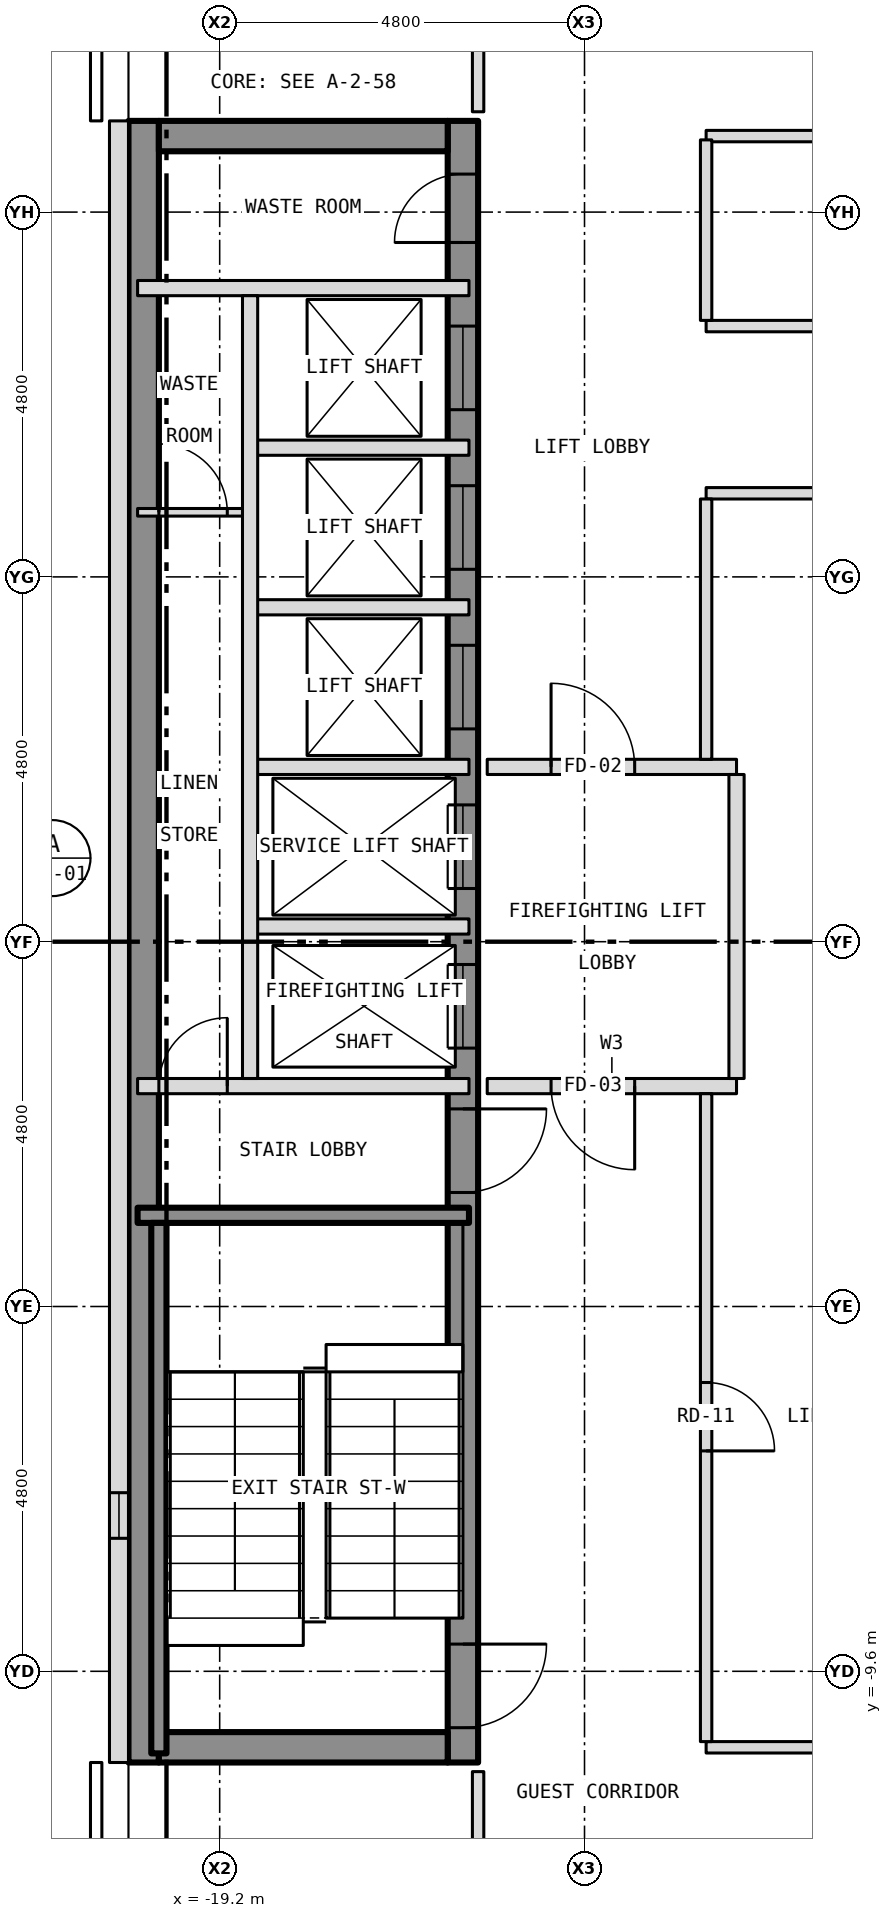
"""IFC4 building model, lengths in metres.
Left out: names, types, materials, properties, quantities, classifications, styles, units other than length and angle.
Written with IfcOpenShell. Run it as: python <this file> out.ifc"""

import sys

from ifc_helpers import new_model, si_unit, direction, frame, frame_2d, origin, place, context, subcontext, project, spatial, rectangle, extrude, element, fill, save


model = new_model("IFC4")
c1 = context("Model", 3, precision=1e-05, world=origin(), true_north=direction((0.0, 1.0)))
c2 = subcontext(c1, "Body", "Model", "MODEL_VIEW")
j1 = project(units=[si_unit("LENGTHUNIT", "METRE"), si_unit("PLANEANGLEUNIT", "RADIAN")], contexts=[c1])
p1 = place(None, origin())
s1 = spatial("IfcSite", under=j1, at=p1, CompositionType="ELEMENT")
p2 = place(p1, origin())
s2 = spatial("IfcBuilding", under=s1, at=p2, CompositionType="ELEMENT")
p3 = place(p2, frame((0.0, 0.0, 212.0)))
s3 = spatial("IfcBuildingStorey", under=s2, at=p3, CompositionType="ELEMENT", Elevation=212.0)
p4 = place(p3, frame((-16.0, -10.8, 0.0), z_axis=(0.0, 0.0, 1.0), x_axis=(0.0, 1.0, 0.0)))
e1 = element("IfcWall", 1, at=p4, inside=s3, PredefinedType="SHEAR", context=c2, shape_type="SweptSolid", body=[
    extrude(rectangle(XDim=21.6, YDim=0.4, at=frame_2d((10.8, 0.0))), origin(), (0.0, 0.0, 1.0), 3.25),
])
p5 = place(p4, frame((9.4, 0.0, 0.0)))
e2 = element("IfcOpeningElement", 2, at=p5, cuts=e1, PredefinedType="OPENING", context=c2, shape_type="SweptSolid", body=[
    extrude(rectangle(XDim=1.1, YDim=2.1, at=frame_2d((0.55, 1.05))), frame((0.0, 0.212, 0.0), z_axis=(0.0, -1.0, 0.0), x_axis=(1.0, 0.0, 0.0)), (0.0, 0.0, 1.0), 0.424),
])
p6 = place(p4, frame((11.5, 0.0, 0.0)))
e3 = element("IfcOpeningElement", 3, at=p6, cuts=e1, PredefinedType="OPENING", context=c2, shape_type="SweptSolid", body=[
    extrude(rectangle(XDim=1.1, YDim=2.1, at=frame_2d((0.55, 1.05))), frame((0.0, 0.212, 0.0), z_axis=(0.0, -1.0, 0.0), x_axis=(1.0, 0.0, 0.0)), (0.0, 0.0, 1.0), 0.424),
])
p7 = place(p4, frame((13.6, 0.0, 0.0)))
e4 = element("IfcOpeningElement", 4, at=p7, cuts=e1, PredefinedType="OPENING", context=c2, shape_type="SweptSolid", body=[
    extrude(rectangle(XDim=1.1, YDim=2.1, at=frame_2d((0.55, 1.05))), frame((0.0, 0.212, 0.0), z_axis=(0.0, -1.0, 0.0), x_axis=(1.0, 0.0, 0.0)), (0.0, 0.0, 1.0), 0.424),
])
p8 = place(p4, frame((15.7, 0.0, 0.0)))
e5 = element("IfcOpeningElement", 5, at=p8, cuts=e1, PredefinedType="OPENING", context=c2, shape_type="SweptSolid", body=[
    extrude(rectangle(XDim=1.1, YDim=2.1, at=frame_2d((0.55, 1.05))), frame((0.0, 0.212, 0.0), z_axis=(0.0, -1.0, 0.0), x_axis=(1.0, 0.0, 0.0)), (0.0, 0.0, 1.0), 0.424),
])
p9 = place(p4, frame((17.8, 0.0, 0.0)))
e6 = element("IfcOpeningElement", 6, at=p9, cuts=e1, PredefinedType="OPENING", context=c2, shape_type="SweptSolid", body=[
    extrude(rectangle(XDim=1.1, YDim=2.1, at=frame_2d((0.55, 1.05))), frame((0.0, 0.212, 0.0), z_axis=(0.0, -1.0, 0.0), x_axis=(1.0, 0.0, 0.0)), (0.0, 0.0, 1.0), 0.424),
])
p10 = place(p4, frame((0.458, 0.0, 0.0)))
e7 = element("IfcOpeningElement", 7, at=p10, cuts=e1, PredefinedType="OPENING", context=c2, shape_type="SweptSolid", body=[
    extrude(rectangle(XDim=1.1, YDim=2.1, at=frame_2d((0.55, 1.05))), frame((0.0, 0.212, 0.0), z_axis=(0.0, -1.0, 0.0), x_axis=(1.0, 0.0, 0.0)), (0.0, 0.0, 1.0), 0.424),
])
p11 = place(p4, frame((7.5, 0.0, 0.0)))
e8 = element("IfcOpeningElement", 8, at=p11, cuts=e1, PredefinedType="OPENING", context=c2, shape_type="SweptSolid", body=[
    extrude(rectangle(XDim=1.1, YDim=2.1, at=frame_2d((0.55, 1.05))), frame((0.0, 0.212, 0.0), z_axis=(0.0, -1.0, 0.0), x_axis=(1.0, 0.0, 0.0)), (0.0, 0.0, 1.0), 0.424),
])
p12 = place(p4, frame((20.0, 0.0, 0.0)))
e9 = element("IfcOpeningElement", 9, at=p12, cuts=e1, PredefinedType="OPENING", context=c2, shape_type="SweptSolid", body=[
    extrude(rectangle(XDim=0.9, YDim=2.1, at=frame_2d((0.45, 1.05))), frame((0.0, 0.212, 0.0), z_axis=(0.0, -1.0, 0.0), x_axis=(1.0, 0.0, 0.0)), (0.0, 0.0, 1.0), 0.424),
])
p13 = place(p3, frame((-20.2, -10.8, 0.0), z_axis=(0.0, 0.0, 1.0), x_axis=(0.0, 1.0, 0.0)))
e10 = element("IfcWall", 10, at=p13, inside=s3, PredefinedType="SHEAR", context=c2, shape_type="SweptSolid", body=[
    extrude(rectangle(XDim=21.6, YDim=0.4, at=frame_2d((10.8, 0.0))), origin(), (0.0, 0.0, 1.0), 3.25),
])
for number, where, z_axis, x_axis in (
    (11, (-20.0, 10.6, 0.0), (0.0, 0.0, 1.0), (1.0, 0.0, 0.0)),
    (12, (-20.0, -10.6, 0.0), (0.0, 0.0, 1.0), (1.0, 0.0, 0.0)),
):
    element("IfcWall", number, at=place(p3, frame(where, z_axis=z_axis, x_axis=x_axis)), inside=s3, PredefinedType="SHEAR", context=c2, shape_type="SweptSolid", body=[
        extrude(rectangle(XDim=3.8, YDim=0.4, at=frame_2d((1.9, 0.0))), origin(), (0.0, 0.0, 1.0), 3.25),
    ])
p14 = place(p3, frame((-20.525, 10.8, 0.0), z_axis=(0.0, 0.0, 1.0), x_axis=(0.0, -1.0, 0.0)))
e13 = element("IfcWall", 13, at=p14, inside=s3, PredefinedType="SOLIDWALL", context=c2, shape_type="SweptSolid", body=[
    extrude(rectangle(XDim=21.6, YDim=0.25, at=frame_2d((10.8, 0.0))), origin(), (0.0, 0.0, 1.0), 3.5),
])
p15 = place(p14, frame((18.05, 0.0, 1.0)))
e14 = element("IfcOpeningElement", 14, at=p15, cuts=e13, PredefinedType="OPENING", context=c2, shape_type="SweptSolid", body=[
    extrude(rectangle(XDim=0.6, YDim=1.5, at=frame_2d((0.3, 0.75))), frame((0.0, 0.137, 0.0), z_axis=(0.0, -1.0, 0.0), x_axis=(1.0, 0.0, 0.0)), (0.0, 0.0, 1.0), 0.274),
])
p16 = place(p3, frame((-12.8, -10.6, 0.0), z_axis=(0.0, 0.0, 1.0), x_axis=(1.0, 0.0, 0.0)))
e15 = element("IfcWall", 15, at=p16, inside=s3, PredefinedType="PARTITIONING", context=c2, shape_type="SweptSolid", body=[
    extrude(rectangle(XDim=13.9, YDim=0.15, at=frame_2d((6.95, 0.0))), origin(), (0.0, 0.0, 1.0), 3.35),
])
p17 = place(p3, frame((-20.28, -3.6, 0.0), z_axis=(0.0, 0.0, 1.0), x_axis=(1.0, 0.0, 0.0)))
e16 = element("IfcWall", 16, at=p17, inside=s3, PredefinedType="SHEAR", context=c2, shape_type="SweptSolid", body=[
    extrude(rectangle(XDim=4.36, YDim=0.2, at=frame_2d((2.18, 0.0))), origin(), (0.0, 0.0, 1.0), 3.25),
])
p18 = place(p3, frame((-20.28, -1.9, 0.0), z_axis=(0.0, 0.0, 1.0), x_axis=(1.0, 0.0, 0.0)))
e17 = element("IfcWall", 17, at=p18, inside=s3, PredefinedType="PARTITIONING", context=c2, shape_type="SweptSolid", body=[
    extrude(rectangle(XDim=4.36, YDim=0.2, at=frame_2d((2.18, 0.0))), origin(), (0.0, 0.0, 1.0), 3.25),
])
p19 = place(p18, frame((0.28, 0.0, 0.0)))
e18 = element("IfcOpeningElement", 18, at=p19, cuts=e17, PredefinedType="OPENING", context=c2, shape_type="SweptSolid", body=[
    extrude(rectangle(XDim=0.9, YDim=2.1, at=frame_2d((0.45, 1.05))), frame((0.0, 0.112, 0.0), z_axis=(0.0, -1.0, 0.0), x_axis=(1.0, 0.0, 0.0)), (0.0, 0.0, 1.0), 0.224),
])
p20 = place(p3, frame((-15.68, -1.9, 0.0), z_axis=(0.0, 0.0, 1.0), x_axis=(1.0, 0.0, 0.0)))
e19 = element("IfcWall", 19, at=p20, inside=s3, PredefinedType="PARTITIONING", context=c2, shape_type="SweptSolid", body=[
    extrude(rectangle(XDim=3.28, YDim=0.2, at=frame_2d((1.64, 0.0))), origin(), (0.0, 0.0, 1.0), 3.35),
])
p21 = place(p20, frame((0.84, 0.0, 0.0)))
e20 = element("IfcOpeningElement", 20, at=p21, cuts=e19, PredefinedType="OPENING", context=c2, shape_type="SweptSolid", body=[
    extrude(rectangle(XDim=1.1, YDim=2.1, at=frame_2d((0.55, 1.05))), frame((0.0, 0.112, 0.0), z_axis=(0.0, -1.0, 0.0), x_axis=(1.0, 0.0, 0.0)), (0.0, 0.0, 1.0), 0.224),
])
for number, where, z_axis, x_axis in (
    (21, (-18.8, 0.2, 0.0), (0.0, 0.0, 1.0), (1.0, 0.0, 0.0)),
    (22, (-18.8, 2.3, 0.0), (0.0, 0.0, 1.0), (1.0, 0.0, 0.0)),
):
    element("IfcWall", number, at=place(p3, frame(where, z_axis=z_axis, x_axis=x_axis)), inside=s3, PredefinedType="PARTITIONING", context=c2, shape_type="SweptSolid", body=[
        extrude(rectangle(XDim=2.88, YDim=0.2, at=frame_2d((1.44, 0.0))), origin(), (0.0, 0.0, 1.0), 3.25),
    ])
p22 = place(p3, frame((-15.68, 2.3, 0.0), z_axis=(0.0, 0.0, 1.0), x_axis=(1.0, 0.0, 0.0)))
e23 = element("IfcWall", 23, at=p22, inside=s3, PredefinedType="PARTITIONING", context=c2, shape_type="SweptSolid", body=[
    extrude(rectangle(XDim=3.28, YDim=0.2, at=frame_2d((1.64, 0.0))), origin(), (0.0, 0.0, 1.0), 3.35),
])
p23 = place(p22, frame((0.84, 0.0, 0.0)))
e24 = element("IfcOpeningElement", 24, at=p23, cuts=e23, PredefinedType="OPENING", context=c2, shape_type="SweptSolid", body=[
    extrude(rectangle(XDim=1.1, YDim=2.1, at=frame_2d((0.55, 1.05))), frame((0.0, 0.112, 0.0), z_axis=(0.0, -1.0, 0.0), x_axis=(1.0, 0.0, 0.0)), (0.0, 0.0, 1.0), 0.224),
])
p24 = place(p3, frame((-18.8, 4.4, 0.0), z_axis=(0.0, 0.0, 1.0), x_axis=(1.0, 0.0, 0.0)))
e25 = element("IfcWall", 25, at=p24, inside=s3, PredefinedType="PARTITIONING", context=c2, shape_type="SweptSolid", body=[
    extrude(rectangle(XDim=2.88, YDim=0.2, at=frame_2d((1.44, 0.0))), origin(), (0.0, 0.0, 1.0), 3.25),
])
p25 = place(p3, frame((-20.28, 5.65, 0.0), z_axis=(0.0, 0.0, 1.0), x_axis=(1.0, 0.0, 0.0)))
e26 = element("IfcWall", 26, at=p25, inside=s3, PredefinedType="PARTITIONING", context=c2, shape_type="SweptSolid", body=[
    extrude(rectangle(XDim=1.48, YDim=0.1, at=frame_2d((0.74, 0.0))), origin(), (0.0, 0.0, 1.0), 3.25),
])
p26 = place(p25, frame((0.28, 0.0, 0.0)))
e27 = element("IfcOpeningElement", 27, at=p26, cuts=e26, PredefinedType="OPENING", context=c2, shape_type="SweptSolid", body=[
    extrude(rectangle(XDim=0.9, YDim=2.1, at=frame_2d((0.45, 1.05))), frame((0.0, 0.062, 0.0), z_axis=(0.0, -1.0, 0.0), x_axis=(1.0, 0.0, 0.0)), (0.0, 0.0, 1.0), 0.124),
])
p27 = place(p3, frame((-12.8, 5.9, 0.0), z_axis=(0.0, 0.0, 1.0), x_axis=(1.0, 0.0, 0.0)))
e28 = element("IfcWall", 28, at=p27, inside=s3, PredefinedType="PARTITIONING", context=c2, shape_type="SweptSolid", body=[
    extrude(rectangle(XDim=13.9, YDim=0.15, at=frame_2d((6.95, 0.0))), origin(), (0.0, 0.0, 1.0), 3.35),
])
p28 = place(p3, frame((-18.8, 6.5, 0.0), z_axis=(0.0, 0.0, 1.0), x_axis=(1.0, 0.0, 0.0)))
e29 = element("IfcWall", 29, at=p28, inside=s3, PredefinedType="PARTITIONING", context=c2, shape_type="SweptSolid", body=[
    extrude(rectangle(XDim=2.88, YDim=0.2, at=frame_2d((1.44, 0.0))), origin(), (0.0, 0.0, 1.0), 3.25),
])
p29 = place(p3, frame((-12.8, 8.1, 0.0), z_axis=(0.0, 0.0, 1.0), x_axis=(1.0, 0.0, 0.0)))
e30 = element("IfcWall", 30, at=p29, inside=s3, PredefinedType="PARTITIONING", context=c2, shape_type="SweptSolid", body=[
    extrude(rectangle(XDim=13.9, YDim=0.15, at=frame_2d((6.95, 0.0))), origin(), (0.0, 0.0, 1.0), 3.35),
])
p30 = place(p3, frame((-20.28, 8.6, 0.0), z_axis=(0.0, 0.0, 1.0), x_axis=(1.0, 0.0, 0.0)))
e31 = element("IfcWall", 31, at=p30, inside=s3, PredefinedType="PARTITIONING", context=c2, shape_type="SweptSolid", body=[
    extrude(rectangle(XDim=4.36, YDim=0.2, at=frame_2d((2.18, 0.0))), origin(), (0.0, 0.0, 1.0), 3.25),
])
p31 = place(p3, frame((-12.8, 10.6, 0.0), z_axis=(0.0, 0.0, 1.0), x_axis=(1.0, 0.0, 0.0)))
e32 = element("IfcWall", 32, at=p31, inside=s3, PredefinedType="PARTITIONING", context=c2, shape_type="SweptSolid", body=[
    extrude(rectangle(XDim=13.9, YDim=0.15, at=frame_2d((6.95, 0.0))), origin(), (0.0, 0.0, 1.0), 3.35),
])
p32 = place(p31, frame((8.1, 0.0, 0.0)))
e33 = element("IfcOpeningElement", 33, at=p32, cuts=e32, PredefinedType="OPENING", context=c2, shape_type="SweptSolid", body=[
    extrude(rectangle(XDim=0.9, YDim=2.1, at=frame_2d((0.45, 1.05))), frame((0.0, 0.087, 0.0), z_axis=(0.0, -1.0, 0.0), x_axis=(1.0, 0.0, 0.0)), (0.0, 0.0, 1.0), 0.174),
])
p33 = place(p3, frame((-20.0, -10.68, 0.0), z_axis=(0.0, 0.0, 1.0), x_axis=(0.0, 1.0, 0.0)))
e34 = element("IfcWall", 34, at=p33, inside=s3, PredefinedType="SHEAR", context=c2, shape_type="SweptSolid", body=[
    extrude(rectangle(XDim=6.98, YDim=0.2, at=frame_2d((3.49, 0.0))), origin(), (0.0, 0.0, 1.0), 3.25),
])
p34 = place(p3, frame((-18.8, -1.8, 0.0), z_axis=(0.0, 0.0, 1.0), x_axis=(0.0, 1.0, 0.0)))
e35 = element("IfcWall", 35, at=p34, inside=s3, PredefinedType="PARTITIONING", context=c2, shape_type="SweptSolid", body=[
    extrude(rectangle(XDim=10.3, YDim=0.2, at=frame_2d((5.15, 0.0))), origin(), (0.0, 0.0, 1.0), 3.25),
])
for number, where, z_axis, x_axis in (
    (36, (-15.8, -12.725, 0.0), (0.0, 0.0, 1.0), (0.0, 1.0, 0.0)),
    (37, (-15.8, 10.92, 0.0), (0.0, 0.0, 1.0), (0.0, 1.0, 0.0)),
):
    element("IfcWall", number, at=place(p3, frame(where, z_axis=z_axis, x_axis=x_axis)), inside=s3, PredefinedType="PARTITIONING", context=c2, shape_type="SweptSolid", body=[
        extrude(rectangle(XDim=1.805, YDim=0.15, at=frame_2d((0.903, 0.0))), origin(), (0.0, 0.0, 1.0), 3.35),
    ])
p35 = place(p3, frame((-12.8, -10.525, 0.0), z_axis=(0.0, 0.0, 1.0), x_axis=(0.0, 1.0, 0.0)))
e38 = element("IfcWall", 38, at=p35, inside=s3, PredefinedType="PARTITIONING", context=c2, shape_type="SweptSolid", body=[
    extrude(rectangle(XDim=8.525, YDim=0.15, at=frame_2d((4.262, 0.0))), origin(), (0.0, 0.0, 1.0), 3.35),
])
p36 = place(p35, frame((3.825, 0.0, 0.0)))
e39 = element("IfcOpeningElement", 39, at=p36, cuts=e38, PredefinedType="OPENING", context=c2, shape_type="SweptSolid", body=[
    extrude(rectangle(XDim=0.9, YDim=2.1, at=frame_2d((0.45, 1.05))), frame((0.0, 0.087, 0.0), z_axis=(0.0, -1.0, 0.0), x_axis=(1.0, 0.0, 0.0)), (0.0, 0.0, 1.0), 0.174),
])
p37 = place(p3, frame((-12.8, 2.4, 0.0), z_axis=(0.0, 0.0, 1.0), x_axis=(0.0, 1.0, 0.0)))
e40 = element("IfcWall", 40, at=p37, inside=s3, PredefinedType="PARTITIONING", context=c2, shape_type="SweptSolid", body=[
    extrude(rectangle(XDim=3.425, YDim=0.15, at=frame_2d((1.712, 0.0))), origin(), (0.0, 0.0, 1.0), 3.35),
])
p38 = place(p3, frame((-12.8, 8.175, 0.0), z_axis=(0.0, 0.0, 1.0), x_axis=(0.0, 1.0, 0.0)))
e41 = element("IfcWall", 41, at=p38, inside=s3, PredefinedType="PARTITIONING", context=c2, shape_type="SweptSolid", body=[
    extrude(rectangle(XDim=2.375, YDim=0.15, at=frame_2d((1.188, 0.0))), origin(), (0.0, 0.0, 1.0), 3.35),
])
p39 = place(p3, frame((-12.4, -1.8, 0.0), z_axis=(0.0, 0.0, 1.0), x_axis=(0.0, 1.0, 0.0)))
e42 = element("IfcWall", 42, at=p39, inside=s3, PredefinedType="PARTITIONING", context=c2, shape_type="SweptSolid", body=[
    extrude(rectangle(XDim=4.0, YDim=0.2, at=frame_2d((2.0, 0.0))), origin(), (0.0, 0.0, 1.0), 3.35),
])
p40 = place(p15, origin())
e43 = element("IfcWindow", 43, at=p40, inside=s3, PartitioningType="SINGLE_PANEL", PredefinedType="WINDOW", context=c2, shape_type="SweptSolid", body=[
    extrude(rectangle(XDim=0.6, YDim=1.5, at=frame_2d((0.3, 0.75))), frame((0.0, -0.035, 0.0), z_axis=(0.0, -1.0, 0.0), x_axis=(1.0, 0.0, 0.0)), (0.0, 0.0, 1.0), 0.06),
])
fill(e14, e43)
p41 = place(p5, origin())
e44 = element("IfcDoor", 44, at=p41, inside=s3, OperationType="SLIDING_TO_LEFT", PredefinedType="DOOR", context=c2, shape_type="SweptSolid", body=[
    extrude(rectangle(XDim=1.1, YDim=2.1, at=frame_2d((0.55, 1.05))), frame((0.0, 0.025, 0.0), z_axis=(0.0, -1.0, 0.0), x_axis=(1.0, 0.0, 0.0)), (0.0, 0.0, 1.0), 0.05),
])
fill(e2, e44)
p42 = place(p6, origin())
e45 = element("IfcDoor", 45, at=p42, inside=s3, OperationType="SLIDING_TO_LEFT", PredefinedType="DOOR", context=c2, shape_type="SweptSolid", body=[
    extrude(rectangle(XDim=1.1, YDim=2.1, at=frame_2d((0.55, 1.05))), frame((0.0, 0.025, 0.0), z_axis=(0.0, -1.0, 0.0), x_axis=(1.0, 0.0, 0.0)), (0.0, 0.0, 1.0), 0.05),
])
fill(e3, e45)
p43 = place(p7, origin())
e46 = element("IfcDoor", 46, at=p43, inside=s3, OperationType="SLIDING_TO_LEFT", PredefinedType="DOOR", context=c2, shape_type="SweptSolid", body=[
    extrude(rectangle(XDim=1.1, YDim=2.1, at=frame_2d((0.55, 1.05))), frame((0.0, 0.025, 0.0), z_axis=(0.0, -1.0, 0.0), x_axis=(1.0, 0.0, 0.0)), (0.0, 0.0, 1.0), 0.05),
])
fill(e4, e46)
p44 = place(p8, origin())
e47 = element("IfcDoor", 47, at=p44, inside=s3, OperationType="SLIDING_TO_LEFT", PredefinedType="DOOR", context=c2, shape_type="SweptSolid", body=[
    extrude(rectangle(XDim=1.1, YDim=2.1, at=frame_2d((0.55, 1.05))), frame((0.0, 0.025, 0.0), z_axis=(0.0, -1.0, 0.0), x_axis=(1.0, 0.0, 0.0)), (0.0, 0.0, 1.0), 0.05),
])
fill(e5, e47)
p45 = place(p9, origin())
e48 = element("IfcDoor", 48, at=p45, inside=s3, OperationType="SLIDING_TO_LEFT", PredefinedType="DOOR", context=c2, shape_type="SweptSolid", body=[
    extrude(rectangle(XDim=1.1, YDim=2.1, at=frame_2d((0.55, 1.05))), frame((0.0, 0.025, 0.0), z_axis=(0.0, -1.0, 0.0), x_axis=(1.0, 0.0, 0.0)), (0.0, 0.0, 1.0), 0.05),
])
fill(e6, e48)
p46 = place(p10, origin())
e49 = element("IfcDoor", 49, at=p46, inside=s3, OperationType="SINGLE_SWING_RIGHT", PredefinedType="DOOR", context=c2, shape_type="SweptSolid", body=[
    extrude(rectangle(XDim=1.1, YDim=2.1, at=frame_2d((0.55, 1.05))), frame((0.0, 0.025, 0.0), z_axis=(0.0, -1.0, 0.0), x_axis=(1.0, 0.0, 0.0)), (0.0, 0.0, 1.0), 0.05),
])
fill(e7, e49)
p47 = place(p11, origin())
e50 = element("IfcDoor", 50, at=p47, inside=s3, OperationType="SINGLE_SWING_RIGHT", PredefinedType="DOOR", context=c2, shape_type="SweptSolid", body=[
    extrude(rectangle(XDim=1.1, YDim=2.1, at=frame_2d((0.55, 1.05))), frame((0.0, 0.025, 0.0), z_axis=(0.0, -1.0, 0.0), x_axis=(1.0, 0.0, 0.0)), (0.0, 0.0, 1.0), 0.05),
])
fill(e8, e50)
p48 = place(p12, origin())
e51 = element("IfcDoor", 51, at=p48, inside=s3, OperationType="SINGLE_SWING_LEFT", PredefinedType="DOOR", context=c2, shape_type="SweptSolid", body=[
    extrude(rectangle(XDim=0.9, YDim=2.1, at=frame_2d((0.45, 1.05))), frame((0.0, 0.025, 0.0), z_axis=(0.0, -1.0, 0.0), x_axis=(1.0, 0.0, 0.0)), (0.0, 0.0, 1.0), 0.05),
])
fill(e9, e51)
p49 = place(p19, origin())
e52 = element("IfcDoor", 52, at=p49, inside=s3, OperationType="SINGLE_SWING_RIGHT", PredefinedType="DOOR", context=c2, shape_type="SweptSolid", body=[
    extrude(rectangle(XDim=0.9, YDim=2.1, at=frame_2d((0.45, 1.05))), frame((0.0, 0.025, 0.0), z_axis=(0.0, -1.0, 0.0), x_axis=(1.0, 0.0, 0.0)), (0.0, 0.0, 1.0), 0.05),
])
fill(e18, e52)
p50 = place(p26, origin())
e53 = element("IfcDoor", 53, at=p50, inside=s3, OperationType="SINGLE_SWING_LEFT", PredefinedType="DOOR", context=c2, shape_type="SweptSolid", body=[
    extrude(rectangle(XDim=0.9, YDim=2.1, at=frame_2d((0.45, 1.05))), frame((0.0, 0.025, 0.0), z_axis=(0.0, -1.0, 0.0), x_axis=(1.0, 0.0, 0.0)), (0.0, 0.0, 1.0), 0.05),
])
fill(e27, e53)
p51 = place(p23, origin())
e54 = element("IfcDoor", 54, at=p51, inside=s3, OperationType="SINGLE_SWING_LEFT", PredefinedType="DOOR", context=c2, shape_type="SweptSolid", body=[
    extrude(rectangle(XDim=1.1, YDim=2.1, at=frame_2d((0.55, 1.05))), frame((0.0, 0.025, 0.0), z_axis=(0.0, -1.0, 0.0), x_axis=(1.0, 0.0, 0.0)), (0.0, 0.0, 1.0), 0.05),
])
fill(e24, e54)
p52 = place(p21, origin())
e55 = element("IfcDoor", 55, at=p52, inside=s3, OperationType="SINGLE_SWING_RIGHT", PredefinedType="DOOR", context=c2, shape_type="SweptSolid", body=[
    extrude(rectangle(XDim=1.1, YDim=2.1, at=frame_2d((0.55, 1.05))), frame((0.0, 0.025, 0.0), z_axis=(0.0, -1.0, 0.0), x_axis=(1.0, 0.0, 0.0)), (0.0, 0.0, 1.0), 0.05),
])
fill(e20, e55)
p53 = place(p36, origin())
e56 = element("IfcDoor", 56, at=p53, inside=s3, OperationType="SINGLE_SWING_LEFT", PredefinedType="DOOR", context=c2, shape_type="SweptSolid", body=[
    extrude(rectangle(XDim=0.9, YDim=2.1, at=frame_2d((0.45, 1.05))), frame((0.0, 0.025, 0.0), z_axis=(0.0, -1.0, 0.0), x_axis=(1.0, 0.0, 0.0)), (0.0, 0.0, 1.0), 0.05),
])
fill(e39, e56)
save(model, sys.argv[1])
